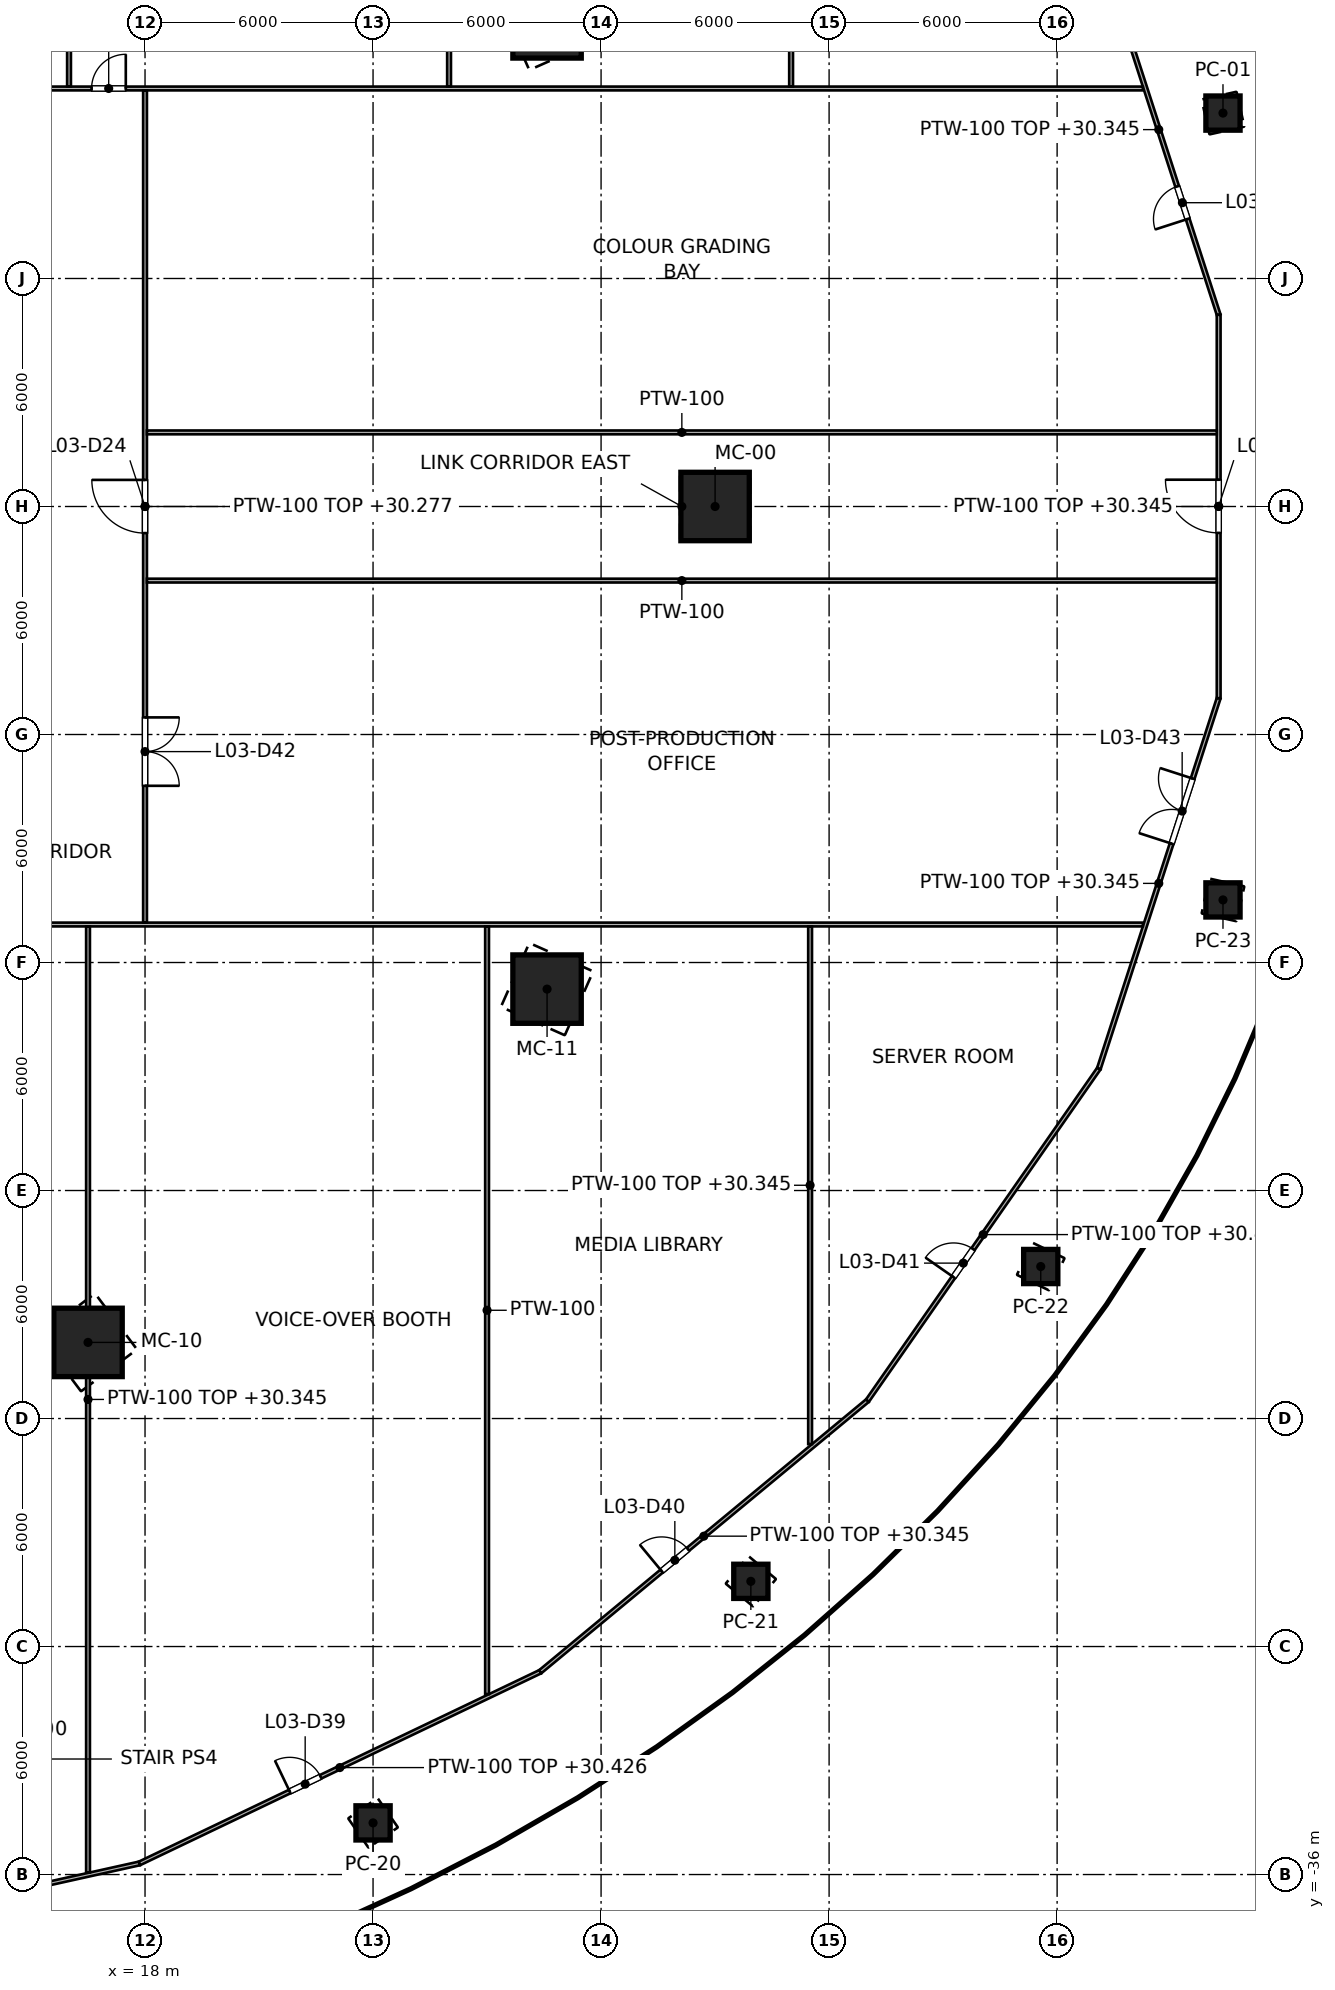
"""IFC4 building model, lengths in metres.
Left out: names, types, materials, properties, quantities, classifications, styles, units other than length and angle.
Written with IfcOpenShell. Run it as: python <this file> out.ifc"""

import sys

from ifc_helpers import new_model, si_unit, direction, frame, frame_2d, origin, origin_2d, place, context, subcontext, project, spatial, rectangle, hollow_rectangle, extrude, element, fill, save


model = new_model("IFC4")
c1 = context("Model", 3, precision=1e-05, world=origin(), true_north=direction((0.0, 1.0)))
c2 = subcontext(c1, "Body", "Model", "MODEL_VIEW")
j1 = project(units=[si_unit("LENGTHUNIT", "METRE"), si_unit("PLANEANGLEUNIT", "RADIAN")], contexts=[c1])
p1 = place(None, origin())
s1 = spatial("IfcSite", under=j1, at=p1, CompositionType="ELEMENT")
p2 = place(p1, origin())
s2 = spatial("IfcBuilding", under=s1, at=p2, CompositionType="ELEMENT")
p3 = place(p2, frame((0.0, 0.0, 26.0)))
s3 = spatial("IfcBuildingStorey", under=s2, at=p3, CompositionType="ELEMENT", Elevation=26.0)
for number, where, z_axis, x_axis in (
    (1, (33.0, 0.0, 0.0), (0.0, 0.0, 1.0), (1.0, 0.0, 0.0)),
    (2, (28.579, 12.7, 0.0), (0.0, 0.0, 1.0), (0.914, 0.406, 0.0)),
    (3, (16.5, -21.997, 0.0), (0.0, 0.0, 1.0), (0.6, -0.8, 0.0)),
    (4, (28.579, -12.7, 0.0), (0.0, 0.0, 1.0), (0.914, -0.406, 0.0)),
):
    element("IfcColumn", number, at=place(p3, frame(where, z_axis=z_axis, x_axis=x_axis)), inside=s3, PredefinedType="COLUMN", context=c2, shape_type="SweptSolid", body=[
        extrude(hollow_rectangle(XDim=1.8, YDim=1.8, WallThickness=0.08, at=origin_2d()), origin(), (0.0, 0.0, 1.0), 5.4),
    ])
for number, where, z_axis, x_axis in (
    (5, (46.365, 10.353, 0.0), (0.0, 0.0, 1.0), (0.976, 0.218, 0.0)),
    (6, (24.0, -34.641, 0.0), (0.0, 0.0, 1.0), (0.569, -0.822, 0.0)),
    (7, (33.941, -28.284, 0.0), (0.0, 0.0, 1.0), (0.768, -0.64, 0.0)),
    (8, (41.569, -20.0, 0.0), (0.0, 0.0, 1.0), (0.901, -0.434, 0.0)),
    (9, (46.365, -10.353, 0.0), (0.0, 0.0, 1.0), (0.976, -0.218, 0.0)),
):
    element("IfcColumn", number, at=place(p3, frame(where, z_axis=z_axis, x_axis=x_axis)), inside=s3, PredefinedType="COLUMN", context=c2, shape_type="SweptSolid", body=[
        extrude(hollow_rectangle(XDim=0.9, YDim=0.9, WallThickness=0.04, at=origin_2d()), origin(), (0.0, 0.0, 1.0), 5.4),
    ])
p4 = place(p3, frame((46.251, 5.045, 0.0), z_axis=(0.0, 0.0, 1.0), x_axis=(-0.307713034182, 0.951479210805, 0.0)))
e10 = element("IfcWall", 10, at=p4, inside=s3, PredefinedType="PARTITIONING", context=c2, shape_type="SweptSolid", body=[
    extrude(rectangle(XDim=10.243, YDim=0.1, at=frame_2d((5.122, 0.0))), origin(), (0.0, 0.0, 1.0), 4.345),
])
p5 = place(p4, frame((2.65, 0.0, 0.0)))
e11 = element("IfcOpeningElement", 11, at=p5, cuts=e10, PredefinedType="OPENING", context=c2, shape_type="SweptSolid", body=[
    extrude(rectangle(XDim=0.9, YDim=2.1, at=frame_2d((0.45, 1.05))), frame((0.0, 0.05, 0.0), z_axis=(0.0, -1.0, 0.0), x_axis=(1.0, 0.0, 0.0)), (0.0, 0.0, 1.0), 0.1),
])
p6 = place(p3, frame((6.089, -38.319, 0.0), z_axis=(0.0, 0.0, 1.0), x_axis=(0.97623471049, 0.216715920124, 0.0)))
e12 = element("IfcWall", 12, at=p6, inside=s3, PredefinedType="PARTITIONING", context=c2, shape_type="SweptSolid", body=[
    extrude(rectangle(XDim=12.05, YDim=0.1, at=frame_2d((6.025, 0.0))), origin(), (0.0, 0.0, 1.0), 4.426),
])
p7 = place(p3, frame((17.852, -35.708, 0.0), z_axis=(0.0, 0.0, 1.0), x_axis=(0.902100999032, 0.431524955878, 0.0)))
e13 = element("IfcWall", 13, at=p7, inside=s3, PredefinedType="PARTITIONING", context=c2, shape_type="SweptSolid", body=[
    extrude(rectangle(XDim=11.691, YDim=0.1, at=frame_2d((5.845, 0.0))), origin(), (0.0, 0.0, 1.0), 4.426),
])
p8 = place(p7, frame((4.385, 0.0, 0.0)))
e14 = element("IfcOpeningElement", 14, at=p8, cuts=e13, PredefinedType="OPENING", context=c2, shape_type="SweptSolid", body=[
    extrude(rectangle(XDim=0.9, YDim=2.1, at=frame_2d((0.45, 1.05))), frame((0.0, 0.05, 0.0), z_axis=(0.0, -1.0, 0.0), x_axis=(1.0, 0.0, 0.0)), (0.0, 0.0, 1.0), 0.1),
])
p9 = place(p3, frame((28.399, -30.663, 0.0), z_axis=(0.0, 0.0, 1.0), x_axis=(0.770046995363, 0.637987166746, 0.0)))
e15 = element("IfcWall", 15, at=p9, inside=s3, PredefinedType="PARTITIONING", context=c2, shape_type="SweptSolid", body=[
    extrude(rectangle(XDim=11.183, YDim=0.1, at=frame_2d((5.591, 0.0))), origin(), (0.0, 0.0, 1.0), 4.345),
])
p10 = place(p9, frame((4.15, 0.0, 0.0)))
e16 = element("IfcOpeningElement", 16, at=p10, cuts=e15, PredefinedType="OPENING", context=c2, shape_type="SweptSolid", body=[
    extrude(rectangle(XDim=0.9, YDim=2.1, at=frame_2d((0.45, 1.05))), frame((0.0, 0.05, 0.0), z_axis=(0.0, -1.0, 0.0), x_axis=(1.0, 0.0, 0.0)), (0.0, 0.0, 1.0), 0.1),
])
p11 = place(p3, frame((37.01, -23.529, 0.0), z_axis=(0.0, 0.0, 1.0), x_axis=(0.571737958261, 0.820436290692, 0.0)))
e17 = element("IfcWall", 17, at=p11, inside=s3, PredefinedType="PARTITIONING", context=c2, shape_type="SweptSolid", body=[
    extrude(rectangle(XDim=10.65, YDim=0.1, at=frame_2d((5.325, 0.0))), origin(), (0.0, 0.0, 1.0), 4.426),
])
p12 = place(p11, frame((3.96, 0.0, 0.0)))
e18 = element("IfcOpeningElement", 18, at=p12, cuts=e17, PredefinedType="OPENING", context=c2, shape_type="SweptSolid", body=[
    extrude(rectangle(XDim=0.9, YDim=2.1, at=frame_2d((0.45, 1.05))), frame((0.0, 0.05, 0.0), z_axis=(0.0, -1.0, 0.0), x_axis=(1.0, 0.0, 0.0)), (0.0, 0.0, 1.0), 0.1),
])
p13 = place(p3, frame((43.099, -14.791, 0.0), z_axis=(0.0, 0.0, 1.0), x_axis=(0.307713034182, 0.951479210805, 0.0)))
e19 = element("IfcWall", 19, at=p13, inside=s3, PredefinedType="PARTITIONING", context=c2, shape_type="SweptSolid", body=[
    extrude(rectangle(XDim=10.243, YDim=0.1, at=frame_2d((5.122, 0.0))), origin(), (0.0, 0.0, 1.0), 4.345),
])
p14 = place(p13, frame((6.221, 0.0, 0.0)))
e20 = element("IfcOpeningElement", 20, at=p14, cuts=e19, PredefinedType="OPENING", context=c2, shape_type="SweptSolid", body=[
    extrude(rectangle(XDim=1.8, YDim=2.1, at=frame_2d((0.9, 1.05))), frame((0.0, 0.05, 0.0), z_axis=(0.0, -1.0, 0.0), x_axis=(1.0, 0.0, 0.0)), (0.0, 0.0, 1.0), 0.1),
])
p15 = place(p3, frame((46.251, -5.045, 0.0), z_axis=(0.0, 0.0, 1.0), x_axis=(0.0, 1.0, 0.0)))
e21 = element("IfcWall", 21, at=p15, inside=s3, PredefinedType="PARTITIONING", context=c2, shape_type="SweptSolid", body=[
    extrude(rectangle(XDim=10.09, YDim=0.1, at=frame_2d((5.045, 0.0))), origin(), (0.0, 0.0, 1.0), 4.345),
])
p16 = place(p15, frame((4.35, 0.0, 0.0)))
e22 = element("IfcOpeningElement", 22, at=p16, cuts=e21, PredefinedType="OPENING", context=c2, shape_type="SweptSolid", body=[
    extrude(rectangle(XDim=1.4, YDim=2.1, at=frame_2d((0.7, 1.05))), frame((0.0, 0.05, 0.0), z_axis=(0.0, -1.0, 0.0), x_axis=(1.0, 0.0, 0.0)), (0.0, 0.0, 1.0), 0.1),
])
p17 = place(p3, frame((-44.256, 11.0, 0.0), z_axis=(0.0, 0.0, 1.0), x_axis=(1.0, 0.0, 0.0)))
e23 = element("IfcWall", 23, at=p17, inside=s3, PredefinedType="PARTITIONING", context=c2, shape_type="SweptSolid", body=[
    extrude(rectangle(XDim=88.512, YDim=0.1, at=frame_2d((44.256, 0.0))), origin(), (0.0, 0.0, 1.0), 4.268),
])
p18 = place(p17, frame((54.2, 0.0, 0.0)))
e24 = element("IfcOpeningElement", 24, at=p18, cuts=e23, PredefinedType="OPENING", context=c2, shape_type="SweptSolid", body=[
    extrude(rectangle(XDim=1.4, YDim=2.1, at=frame_2d((0.7, 1.05))), frame((0.0, 0.05, 0.0), z_axis=(0.0, -1.0, 0.0), x_axis=(1.0, 0.0, 0.0)), (0.0, 0.0, 1.0), 0.1),
])
p19 = place(p17, frame((32.9, 0.0, 0.0)))
e25 = element("IfcOpeningElement", 25, at=p19, cuts=e23, PredefinedType="OPENING", context=c2, shape_type="SweptSolid", body=[
    extrude(rectangle(XDim=1.4, YDim=2.1, at=frame_2d((0.7, 1.05))), frame((0.0, 0.05, 0.0), z_axis=(0.0, -1.0, 0.0), x_axis=(1.0, 0.0, 0.0)), (0.0, 0.0, 1.0), 0.1),
])
p20 = place(p17, frame((29.15, 0.0, 0.0)))
e26 = element("IfcOpeningElement", 26, at=p20, cuts=e23, PredefinedType="OPENING", context=c2, shape_type="SweptSolid", body=[
    extrude(rectangle(XDim=0.9, YDim=2.1, at=frame_2d((0.45, 1.05))), frame((0.0, 0.05, 0.0), z_axis=(0.0, -1.0, 0.0), x_axis=(1.0, 0.0, 0.0)), (0.0, 0.0, 1.0), 0.1),
])
p21 = place(p17, frame((46.55, 0.0, 0.0)))
e27 = element("IfcOpeningElement", 27, at=p21, cuts=e23, PredefinedType="OPENING", context=c2, shape_type="SweptSolid", body=[
    extrude(rectangle(XDim=0.9, YDim=2.1, at=frame_2d((0.45, 1.05))), frame((0.0, 0.05, 0.0), z_axis=(0.0, -1.0, 0.0), x_axis=(1.0, 0.0, 0.0)), (0.0, 0.0, 1.0), 0.1),
])
p22 = place(p17, frame((60.85, 0.0, 0.0)))
e28 = element("IfcOpeningElement", 28, at=p22, cuts=e23, PredefinedType="OPENING", context=c2, shape_type="SweptSolid", body=[
    extrude(rectangle(XDim=0.9, YDim=2.1, at=frame_2d((0.45, 1.05))), frame((0.0, 0.05, 0.0), z_axis=(0.0, -1.0, 0.0), x_axis=(1.0, 0.0, 0.0)), (0.0, 0.0, 1.0), 0.1),
])
p23 = place(p3, frame((-44.256, -11.0, 0.0), z_axis=(0.0, 0.0, 1.0), x_axis=(1.0, 0.0, 0.0)))
e29 = element("IfcWall", 29, at=p23, inside=s3, PredefinedType="PARTITIONING", context=c2, shape_type="SweptSolid", body=[
    extrude(rectangle(XDim=88.512, YDim=0.1, at=frame_2d((44.256, 0.0))), origin(), (0.0, 0.0, 1.0), 4.268),
])
p24 = place(p23, frame((32.9, 0.0, 0.0)))
e30 = element("IfcOpeningElement", 30, at=p24, cuts=e29, PredefinedType="OPENING", context=c2, shape_type="SweptSolid", body=[
    extrude(rectangle(XDim=1.4, YDim=2.1, at=frame_2d((0.7, 1.05))), frame((0.0, 0.05, 0.0), z_axis=(0.0, -1.0, 0.0), x_axis=(1.0, 0.0, 0.0)), (0.0, 0.0, 1.0), 0.1),
])
p25 = place(p23, frame((54.2, 0.0, 0.0)))
e31 = element("IfcOpeningElement", 31, at=p25, cuts=e29, PredefinedType="OPENING", context=c2, shape_type="SweptSolid", body=[
    extrude(rectangle(XDim=1.4, YDim=2.1, at=frame_2d((0.7, 1.05))), frame((0.0, 0.05, 0.0), z_axis=(0.0, -1.0, 0.0), x_axis=(1.0, 0.0, 0.0)), (0.0, 0.0, 1.0), 0.1),
])
p26 = place(p23, frame((37.85, 0.0, 0.0)))
e32 = element("IfcOpeningElement", 32, at=p26, cuts=e29, PredefinedType="OPENING", context=c2, shape_type="SweptSolid", body=[
    extrude(rectangle(XDim=0.9, YDim=2.1, at=frame_2d((0.45, 1.05))), frame((0.0, 0.05, 0.0), z_axis=(0.0, -1.0, 0.0), x_axis=(1.0, 0.0, 0.0)), (0.0, 0.0, 1.0), 0.1),
])
p27 = place(p23, frame((47.3, 0.0, 0.0)))
e33 = element("IfcOpeningElement", 33, at=p27, cuts=e29, PredefinedType="OPENING", context=c2, shape_type="SweptSolid", body=[
    extrude(rectangle(XDim=0.9, YDim=2.1, at=frame_2d((0.45, 1.05))), frame((0.0, 0.05, 0.0), z_axis=(0.0, -1.0, 0.0), x_axis=(1.0, 0.0, 0.0)), (0.0, 0.0, 1.0), 0.1),
])
p28 = place(p3, frame((18.0, -10.95, 0.0), z_axis=(0.0, 0.0, 1.0), x_axis=(0.0, 1.0, 0.0)))
e34 = element("IfcWall", 34, at=p28, inside=s3, PredefinedType="PARTITIONING", context=c2, shape_type="SweptSolid", body=[
    extrude(rectangle(XDim=21.9, YDim=0.1, at=frame_2d((10.95, 0.0))), origin(), (0.0, 0.0, 1.0), 4.277),
])
p29 = place(p28, frame((10.25, 0.0, 0.0)))
e35 = element("IfcOpeningElement", 35, at=p29, cuts=e34, PredefinedType="OPENING", context=c2, shape_type="SweptSolid", body=[
    extrude(rectangle(XDim=1.4, YDim=2.1, at=frame_2d((0.7, 1.05))), frame((0.0, 0.05, 0.0), z_axis=(0.0, -1.0, 0.0), x_axis=(1.0, 0.0, 0.0)), (0.0, 0.0, 1.0), 0.1),
])
p30 = place(p28, frame((3.6, 0.0, 0.0)))
e36 = element("IfcOpeningElement", 36, at=p30, cuts=e34, PredefinedType="OPENING", context=c2, shape_type="SweptSolid", body=[
    extrude(rectangle(XDim=1.8, YDim=2.1, at=frame_2d((0.9, 1.05))), frame((0.0, 0.05, 0.0), z_axis=(0.0, -1.0, 0.0), x_axis=(1.0, 0.0, 0.0)), (0.0, 0.0, 1.0), 0.1),
])
p31 = place(p3, frame((16.0, 11.05, 0.0), z_axis=(0.0, 0.0, 1.0), x_axis=(0.0, 1.0, 0.0)))
e37 = element("IfcWall", 37, at=p31, inside=s3, PredefinedType="PARTITIONING", context=c2, shape_type="SweptSolid", body=[
    extrude(rectangle(XDim=25.007, YDim=0.1, at=frame_2d((12.503, 0.0))), origin(), (0.0, 0.0, 1.0), 4.277),
])
p32 = place(p3, frame((26.0, 11.05, 0.0), z_axis=(0.0, 0.0, 1.0), x_axis=(0.0, 1.0, 0.0)))
e38 = element("IfcWall", 38, at=p32, inside=s3, PredefinedType="PARTITIONING", context=c2, shape_type="SweptSolid", body=[
    extrude(rectangle(XDim=20.681, YDim=0.1, at=frame_2d((10.341, 0.0))), origin(), (0.0, 0.0, 1.0), 4.268),
])
p33 = place(p3, frame((35.0, 11.05, 0.0), z_axis=(0.0, 0.0, 1.0), x_axis=(0.0, 1.0, 0.0)))
e39 = element("IfcWall", 39, at=p33, inside=s3, PredefinedType="PARTITIONING", context=c2, shape_type="SweptSolid", body=[
    extrude(rectangle(XDim=14.037, YDim=0.1, at=frame_2d((7.019, 0.0))), origin(), (0.0, 0.0, 1.0), 4.345),
])
p34 = place(p3, frame((16.5, -11.05, 0.0), z_axis=(0.0, 0.0, 1.0), x_axis=(0.0, -1.0, 0.0)))
e40 = element("IfcWall", 40, at=p34, inside=s3, PredefinedType="PARTITIONING", context=c2, shape_type="SweptSolid", body=[
    extrude(rectangle(XDim=24.896, YDim=0.1, at=frame_2d((12.448, 0.0))), origin(), (0.0, 0.0, 1.0), 4.345),
])
p35 = place(p3, frame((27.0, -11.05, 0.0), z_axis=(0.0, 0.0, 1.0), x_axis=(0.0, -1.0, 0.0)))
e41 = element("IfcWall", 41, at=p35, inside=s3, PredefinedType="PARTITIONING", context=c2, shape_type="SweptSolid", body=[
    extrude(rectangle(XDim=20.203, YDim=0.1, at=frame_2d((10.101, 0.0))), origin(), (0.0, 0.0, 1.0), 4.268),
])
p36 = place(p3, frame((35.5, -11.05, 0.0), z_axis=(0.0, 0.0, 1.0), x_axis=(0.0, -1.0, 0.0)))
e42 = element("IfcWall", 42, at=p36, inside=s3, PredefinedType="PARTITIONING", context=c2, shape_type="SweptSolid", body=[
    extrude(rectangle(XDim=13.623, YDim=0.1, at=frame_2d((6.812, 0.0))), origin(), (0.0, 0.0, 1.0), 4.345),
])
for number, where, z_axis, x_axis in (
    (43, (18.05, -1.95, 0.0), (0.0, 0.0, 1.0), (1.0, 0.0, 0.0)),
    (44, (18.05, 1.95, 0.0), (0.0, 0.0, 1.0), (1.0, 0.0, 0.0)),
):
    element("IfcWall", number, at=place(p3, frame(where, z_axis=z_axis, x_axis=x_axis)), inside=s3, PredefinedType="PARTITIONING", context=c2, shape_type="SweptSolid", body=[
        extrude(rectangle(XDim=28.151, YDim=0.1, at=frame_2d((14.075, 0.0))), origin(), (0.0, 0.0, 1.0), 4.268),
    ])
p37 = place(p29, origin())
e45 = element("IfcDoor", 45, at=p37, inside=s3, OperationType="SINGLE_SWING_RIGHT", PredefinedType="DOOR", context=c2, shape_type="SweptSolid", body=[
    extrude(rectangle(XDim=1.4, YDim=2.1, at=frame_2d((0.7, 1.05))), frame((0.0, 0.025, 0.0), z_axis=(0.0, -1.0, 0.0), x_axis=(1.0, 0.0, 0.0)), (0.0, 0.0, 1.0), 0.05),
])
fill(e35, e45)
p38 = place(p16, origin())
e46 = element("IfcDoor", 46, at=p38, inside=s3, OperationType="SINGLE_SWING_RIGHT", PredefinedType="DOOR", context=c2, shape_type="SweptSolid", body=[
    extrude(rectangle(XDim=1.4, YDim=2.1, at=frame_2d((0.7, 1.05))), frame((0.0, 0.025, 0.0), z_axis=(0.0, -1.0, 0.0), x_axis=(1.0, 0.0, 0.0)), (0.0, 0.0, 1.0), 0.05),
])
fill(e22, e46)
p39 = place(p22, origin())
e47 = element("IfcDoor", 47, at=p39, inside=s3, OperationType="SINGLE_SWING_RIGHT", PredefinedType="DOOR", context=c2, shape_type="SweptSolid", body=[
    extrude(rectangle(XDim=0.9, YDim=2.1, at=frame_2d((0.45, 1.05))), frame((0.0, 0.025, 0.0), z_axis=(0.0, -1.0, 0.0), x_axis=(1.0, 0.0, 0.0)), (0.0, 0.0, 1.0), 0.05),
])
fill(e28, e47)
p40 = place(p8, origin())
e48 = element("IfcDoor", 48, at=p40, inside=s3, OperationType="SINGLE_SWING_LEFT", PredefinedType="DOOR", context=c2, shape_type="SweptSolid", body=[
    extrude(rectangle(XDim=0.9, YDim=2.1, at=frame_2d((0.45, 1.05))), frame((0.0, 0.025, 0.0), z_axis=(0.0, -1.0, 0.0), x_axis=(1.0, 0.0, 0.0)), (0.0, 0.0, 1.0), 0.05),
])
fill(e14, e48)
p41 = place(p10, origin())
e49 = element("IfcDoor", 49, at=p41, inside=s3, OperationType="SINGLE_SWING_LEFT", PredefinedType="DOOR", context=c2, shape_type="SweptSolid", body=[
    extrude(rectangle(XDim=0.9, YDim=2.1, at=frame_2d((0.45, 1.05))), frame((0.0, 0.025, 0.0), z_axis=(0.0, -1.0, 0.0), x_axis=(1.0, 0.0, 0.0)), (0.0, 0.0, 1.0), 0.05),
])
fill(e16, e49)
p42 = place(p12, origin())
e50 = element("IfcDoor", 50, at=p42, inside=s3, OperationType="SINGLE_SWING_LEFT", PredefinedType="DOOR", context=c2, shape_type="SweptSolid", body=[
    extrude(rectangle(XDim=0.9, YDim=2.1, at=frame_2d((0.45, 1.05))), frame((0.0, 0.025, 0.0), z_axis=(0.0, -1.0, 0.0), x_axis=(1.0, 0.0, 0.0)), (0.0, 0.0, 1.0), 0.05),
])
fill(e18, e50)
p43 = place(p30, origin())
e51 = element("IfcDoor", 51, at=p43, inside=s3, OperationType="DOUBLE_DOOR_SINGLE_SWING", PredefinedType="DOOR", context=c2, shape_type="SweptSolid", body=[
    extrude(rectangle(XDim=1.8, YDim=2.1, at=frame_2d((0.9, 1.05))), frame((0.0, 0.025, 0.0), z_axis=(0.0, -1.0, 0.0), x_axis=(1.0, 0.0, 0.0)), (0.0, 0.0, 1.0), 0.05),
])
fill(e36, e51)
p44 = place(p14, origin())
e52 = element("IfcDoor", 52, at=p44, inside=s3, OperationType="DOUBLE_DOOR_SINGLE_SWING", PredefinedType="DOOR", context=c2, shape_type="SweptSolid", body=[
    extrude(rectangle(XDim=1.8, YDim=2.1, at=frame_2d((0.9, 1.05))), frame((0.0, 0.025, 0.0), z_axis=(0.0, -1.0, 0.0), x_axis=(1.0, 0.0, 0.0)), (0.0, 0.0, 1.0), 0.05),
])
fill(e20, e52)
p45 = place(p5, origin())
e53 = element("IfcDoor", 53, at=p45, inside=s3, OperationType="SINGLE_SWING_LEFT", PredefinedType="DOOR", context=c2, shape_type="SweptSolid", body=[
    extrude(rectangle(XDim=0.9, YDim=2.1, at=frame_2d((0.45, 1.05))), frame((0.0, 0.025, 0.0), z_axis=(0.0, -1.0, 0.0), x_axis=(1.0, 0.0, 0.0)), (0.0, 0.0, 1.0), 0.05),
])
fill(e11, e53)
save(model, sys.argv[1])
